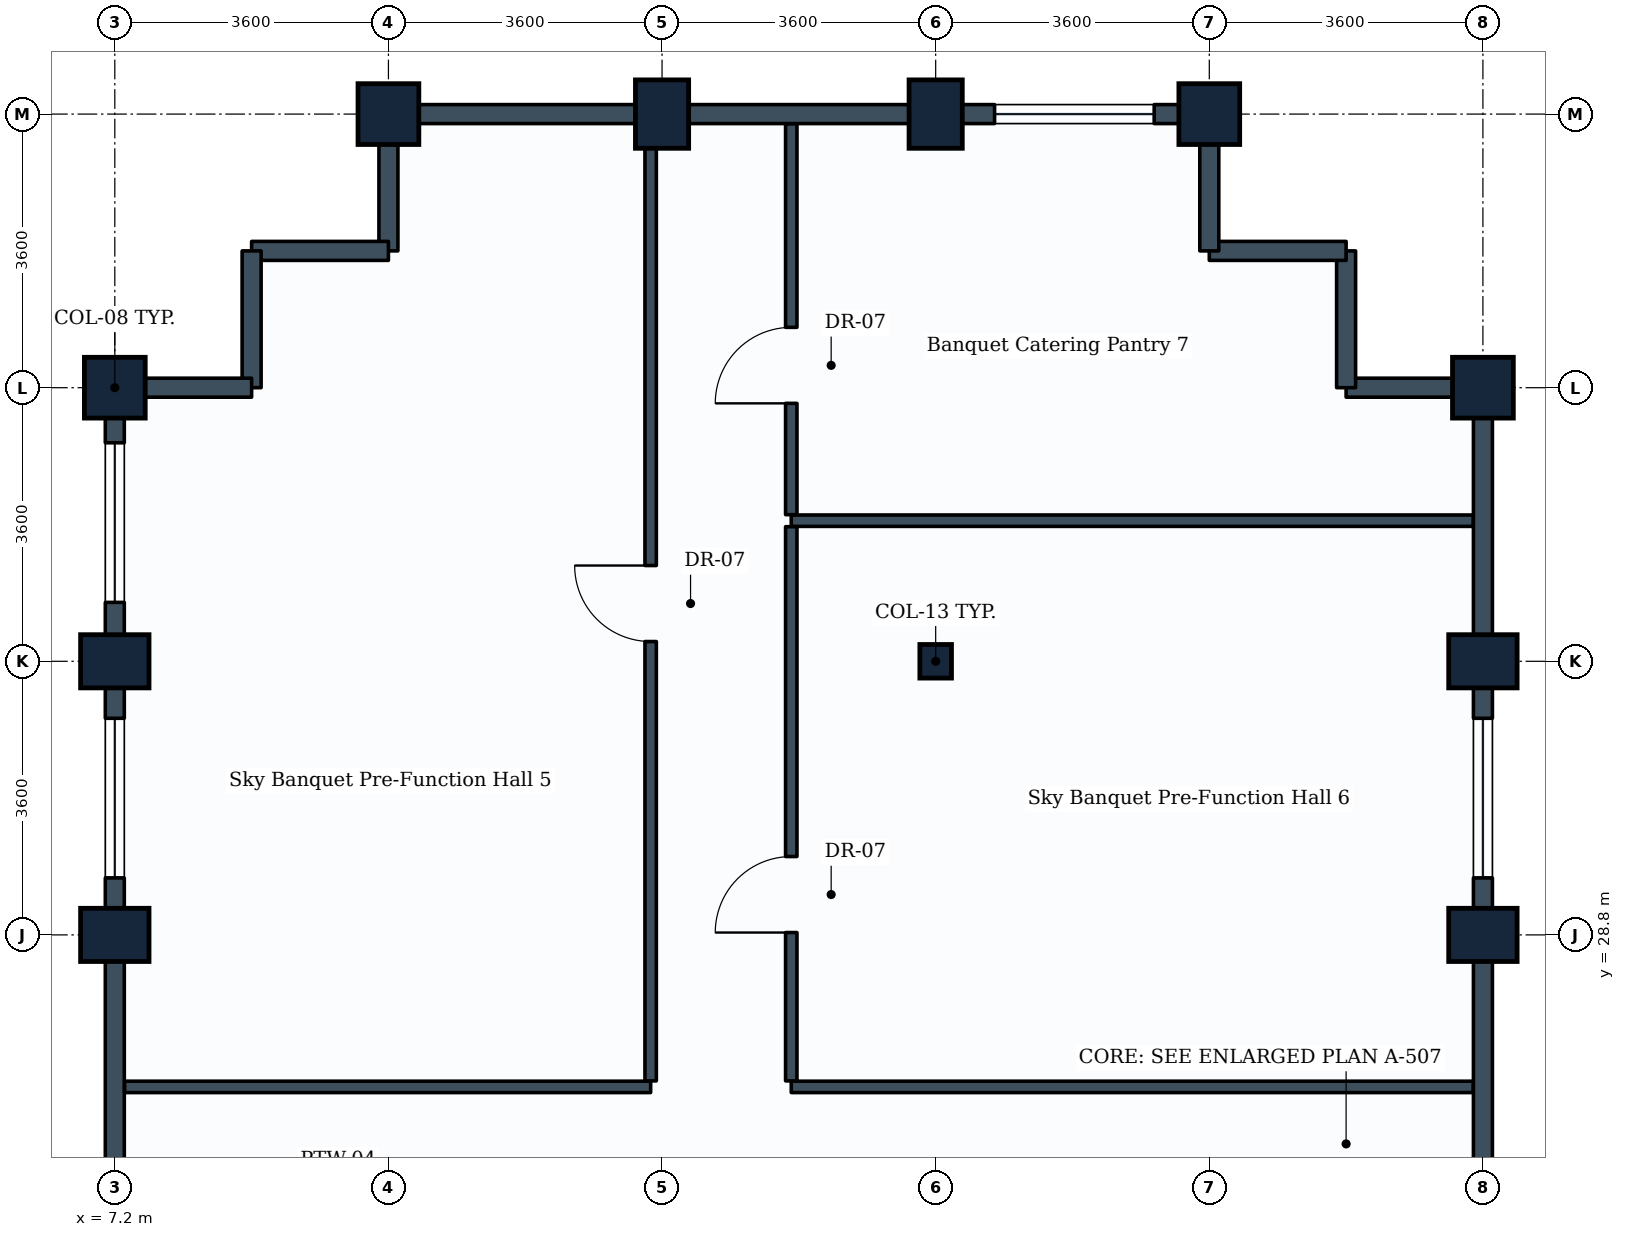
"""IFC4 building model, lengths in metres.
Left out: names, types, materials, properties, quantities, classifications, styles, units other than length and angle.
Written with IfcOpenShell. Run it as: python <this file> out.ifc"""

import sys

from ifc_helpers import new_model, si_unit, direction, frame, frame_2d, origin, origin_2d, place, context, subcontext, project, spatial, rectangle, i_section, extrude, element, fill, save


model = new_model("IFC4")
c1 = context("Model", 3, precision=1e-05, world=origin(), true_north=direction((0.0, 1.0)))
c2 = subcontext(c1, "Body", "Model", "MODEL_VIEW")
j1 = project(units=[si_unit("LENGTHUNIT", "METRE"), si_unit("PLANEANGLEUNIT", "RADIAN")], contexts=[c1])
p1 = place(None, origin())
s1 = spatial("IfcSite", under=j1, at=p1, CompositionType="ELEMENT")
p2 = place(p1, origin())
s2 = spatial("IfcBuilding", under=s1, at=p2, CompositionType="ELEMENT")
p3 = place(p2, frame((0.0, 0.0, 201.4)))
s3 = spatial("IfcBuildingStorey", under=s2, at=p3, CompositionType="ELEMENT", Elevation=201.4)
for number, where, z_axis, x_axis in (
    (1, (7.2, 28.8, 0.0), (0.0, 0.0, 1.0), (0.0, 1.0, 0.0)),
    (2, (7.2, 32.4, 0.0), (0.0, 0.0, 1.0), (0.0, 1.0, 0.0)),
):
    element("IfcColumn", number, at=place(p3, frame(where, z_axis=z_axis, x_axis=x_axis)), inside=s3, PredefinedType="COLUMN", context=c2, shape_type="SweptSolid", body=[
        extrude(rectangle(XDim=0.7, YDim=0.9, at=origin_2d()), origin(), (0.0, 0.0, 1.0), 3.8),
    ])
for number, where, z_axis, x_axis in (
    (3, (7.2, 36.0, 0.0), (0.0, 0.0, 1.0), (0.0, 1.0, 0.0)),
    (4, (10.8, 39.6, 0.0), (0.0, 0.0, 1.0), (1.0, 0.0, 0.0)),
):
    element("IfcColumn", number, at=place(p3, frame(where, z_axis=z_axis, x_axis=x_axis)), inside=s3, PredefinedType="COLUMN", context=c2, shape_type="SweptSolid", body=[
        extrude(rectangle(XDim=0.8, YDim=0.8, at=origin_2d()), origin(), (0.0, 0.0, 1.0), 3.8),
    ])
p4 = place(p3, frame((14.4, 39.6, 0.0), z_axis=(0.0, 0.0, 1.0), x_axis=(1.0, 0.0, 0.0)))
e5 = element("IfcColumn", 5, at=p4, inside=s3, PredefinedType="COLUMN", context=c2, shape_type="SweptSolid", body=[
    extrude(rectangle(XDim=0.7, YDim=0.9, at=origin_2d()), origin(), (0.0, 0.0, 1.0), 3.8),
])
p5 = place(p3, frame((18.0, 32.4, 0.0), z_axis=(0.0, 0.0, 1.0), x_axis=(1.0, 0.0, 0.0)))
e6 = element("IfcColumn", 6, at=p5, inside=s3, PredefinedType="COLUMN", context=c2, shape_type="SweptSolid", body=[
    extrude(i_section(OverallWidth=0.416, OverallDepth=0.442, WebThickness=0.025, FlangeThickness=0.041, FilletRadius=0.015, at=origin_2d()), origin(), (0.0, 0.0, 1.0), 3.8),
])
p6 = place(p3, frame((18.0, 39.6, 0.0), z_axis=(0.0, 0.0, 1.0), x_axis=(1.0, 0.0, 0.0)))
e7 = element("IfcColumn", 7, at=p6, inside=s3, PredefinedType="COLUMN", context=c2, shape_type="SweptSolid", body=[
    extrude(rectangle(XDim=0.7, YDim=0.9, at=origin_2d()), origin(), (0.0, 0.0, 1.0), 3.8),
])
p7 = place(p3, frame((21.6, 39.6, 0.0), z_axis=(0.0, 0.0, 1.0), x_axis=(1.0, 0.0, 0.0)))
e8 = element("IfcColumn", 8, at=p7, inside=s3, PredefinedType="COLUMN", context=c2, shape_type="SweptSolid", body=[
    extrude(rectangle(XDim=0.8, YDim=0.8, at=origin_2d()), origin(), (0.0, 0.0, 1.0), 3.8),
])
for number, where, z_axis, x_axis in (
    (9, (25.2, 28.8, 0.0), (0.0, 0.0, 1.0), (0.0, 1.0, 0.0)),
    (10, (25.2, 32.4, 0.0), (0.0, 0.0, 1.0), (0.0, 1.0, 0.0)),
):
    element("IfcColumn", number, at=place(p3, frame(where, z_axis=z_axis, x_axis=x_axis)), inside=s3, PredefinedType="COLUMN", context=c2, shape_type="SweptSolid", body=[
        extrude(rectangle(XDim=0.7, YDim=0.9, at=origin_2d()), origin(), (0.0, 0.0, 1.0), 3.8),
    ])
p8 = place(p3, frame((25.2, 36.0, 0.0), z_axis=(0.0, 0.0, 1.0), x_axis=(0.0, 1.0, 0.0)))
e11 = element("IfcColumn", 11, at=p8, inside=s3, PredefinedType="COLUMN", context=c2, shape_type="SweptSolid", body=[
    extrude(rectangle(XDim=0.8, YDim=0.8, at=origin_2d()), origin(), (0.0, 0.0, 1.0), 3.8),
])
p9 = place(p3, frame((25.2, 25.2, 0.0), z_axis=(0.0, 0.0, 1.0), x_axis=(0.0, 1.0, 0.0)))
e12 = element("IfcWall", 12, at=p9, inside=s3, PredefinedType="STANDARD", context=c2, shape_type="SweptSolid", body=[
    extrude(rectangle(XDim=3.6, YDim=0.25, at=frame_2d((1.8, 0.0))), origin(), (0.0, 0.0, 1.0), 2.93),
])
p10 = place(p3, frame((25.2, 28.8, 0.0), z_axis=(0.0, 0.0, 1.0), x_axis=(0.0, 1.0, 0.0)))
e13 = element("IfcWall", 13, at=p10, inside=s3, PredefinedType="STANDARD", context=c2, shape_type="SweptSolid", body=[
    extrude(rectangle(XDim=3.6, YDim=0.25, at=frame_2d((1.8, 0.0))), origin(), (0.0, 0.0, 1.0), 2.93),
])
p11 = place(p10, frame((0.75, 0.0, 0.85)))
e14 = element("IfcOpeningElement", 14, at=p11, cuts=e13, PredefinedType="OPENING", context=c2, shape_type="SweptSolid", body=[
    extrude(rectangle(XDim=2.1, YDim=1.35, at=frame_2d((1.05, 0.675))), frame((0.0, 0.135, 0.0), z_axis=(0.0, -1.0, 0.0), x_axis=(1.0, 0.0, 0.0)), (0.0, 0.0, 1.0), 0.27),
])
p12 = place(p3, frame((25.2, 32.4, 0.0), z_axis=(0.0, 0.0, 1.0), x_axis=(0.0, 1.0, 0.0)))
e15 = element("IfcWall", 15, at=p12, inside=s3, PredefinedType="STANDARD", context=c2, shape_type="SweptSolid", body=[
    extrude(rectangle(XDim=3.6, YDim=0.25, at=frame_2d((1.8, 0.0))), origin(), (0.0, 0.0, 1.0), 2.93),
])
p13 = place(p3, frame((23.4, 36.0, 0.0), z_axis=(0.0, 0.0, 1.0), x_axis=(1.0, 0.0, 0.0)))
e16 = element("IfcWall", 16, at=p13, inside=s3, PredefinedType="STANDARD", context=c2, shape_type="SweptSolid", body=[
    extrude(rectangle(XDim=1.8, YDim=0.25, at=frame_2d((0.9, 0.0))), origin(), (0.0, 0.0, 1.0), 2.93),
])
p14 = place(p3, frame((23.4, 36.0, 0.0), z_axis=(0.0, 0.0, 1.0), x_axis=(0.0, 1.0, 0.0)))
e17 = element("IfcWall", 17, at=p14, inside=s3, PredefinedType="STANDARD", context=c2, shape_type="SweptSolid", body=[
    extrude(rectangle(XDim=1.8, YDim=0.25, at=frame_2d((0.9, 0.0))), origin(), (0.0, 0.0, 1.0), 3.535),
])
p15 = place(p3, frame((21.6, 37.8, 0.0), z_axis=(0.0, 0.0, 1.0), x_axis=(1.0, 0.0, 0.0)))
e18 = element("IfcWall", 18, at=p15, inside=s3, PredefinedType="STANDARD", context=c2, shape_type="SweptSolid", body=[
    extrude(rectangle(XDim=1.8, YDim=0.25, at=frame_2d((0.9, 0.0))), origin(), (0.0, 0.0, 1.0), 3.535),
])
p16 = place(p3, frame((21.6, 37.8, 0.0), z_axis=(0.0, 0.0, 1.0), x_axis=(0.0, 1.0, 0.0)))
e19 = element("IfcWall", 19, at=p16, inside=s3, PredefinedType="STANDARD", context=c2, shape_type="SweptSolid", body=[
    extrude(rectangle(XDim=1.8, YDim=0.25, at=frame_2d((0.9, 0.0))), origin(), (0.0, 0.0, 1.0), 2.93),
])
p17 = place(p3, frame((18.0, 39.6, 0.0), z_axis=(0.0, 0.0, 1.0), x_axis=(1.0, 0.0, 0.0)))
e20 = element("IfcWall", 20, at=p17, inside=s3, PredefinedType="STANDARD", context=c2, shape_type="SweptSolid", body=[
    extrude(rectangle(XDim=3.6, YDim=0.25, at=frame_2d((1.8, 0.0))), origin(), (0.0, 0.0, 1.0), 2.93),
])
p18 = place(p17, frame((0.775, 0.0, 0.85)))
e21 = element("IfcOpeningElement", 21, at=p18, cuts=e20, PredefinedType="OPENING", context=c2, shape_type="SweptSolid", body=[
    extrude(rectangle(XDim=2.1, YDim=1.35, at=frame_2d((1.05, 0.675))), frame((0.0, 0.135, 0.0), z_axis=(0.0, -1.0, 0.0), x_axis=(1.0, 0.0, 0.0)), (0.0, 0.0, 1.0), 0.27),
])
p19 = place(p3, frame((14.4, 39.6, 0.0), z_axis=(0.0, 0.0, 1.0), x_axis=(1.0, 0.0, 0.0)))
e22 = element("IfcWall", 22, at=p19, inside=s3, PredefinedType="STANDARD", context=c2, shape_type="SweptSolid", body=[
    extrude(rectangle(XDim=3.6, YDim=0.25, at=frame_2d((1.8, 0.0))), origin(), (0.0, 0.0, 1.0), 2.93),
])
p20 = place(p3, frame((10.8, 39.6, 0.0), z_axis=(0.0, 0.0, 1.0), x_axis=(1.0, 0.0, 0.0)))
e23 = element("IfcWall", 23, at=p20, inside=s3, PredefinedType="STANDARD", context=c2, shape_type="SweptSolid", body=[
    extrude(rectangle(XDim=3.6, YDim=0.25, at=frame_2d((1.8, 0.0))), origin(), (0.0, 0.0, 1.0), 2.93),
])
p21 = place(p3, frame((10.8, 37.8, 0.0), z_axis=(0.0, 0.0, 1.0), x_axis=(0.0, 1.0, 0.0)))
e24 = element("IfcWall", 24, at=p21, inside=s3, PredefinedType="STANDARD", context=c2, shape_type="SweptSolid", body=[
    extrude(rectangle(XDim=1.8, YDim=0.25, at=frame_2d((0.9, 0.0))), origin(), (0.0, 0.0, 1.0), 2.93),
])
for number, where, z_axis, x_axis in (
    (25, (9.0, 37.8, 0.0), (0.0, 0.0, 1.0), (1.0, 0.0, 0.0)),
    (26, (9.0, 36.0, 0.0), (0.0, 0.0, 1.0), (0.0, 1.0, 0.0)),
):
    element("IfcWall", number, at=place(p3, frame(where, z_axis=z_axis, x_axis=x_axis)), inside=s3, PredefinedType="STANDARD", context=c2, shape_type="SweptSolid", body=[
        extrude(rectangle(XDim=1.8, YDim=0.25, at=frame_2d((0.9, 0.0))), origin(), (0.0, 0.0, 1.0), 3.535),
    ])
p22 = place(p3, frame((7.2, 36.0, 0.0), z_axis=(0.0, 0.0, 1.0), x_axis=(1.0, 0.0, 0.0)))
e27 = element("IfcWall", 27, at=p22, inside=s3, PredefinedType="STANDARD", context=c2, shape_type="SweptSolid", body=[
    extrude(rectangle(XDim=1.8, YDim=0.25, at=frame_2d((0.9, 0.0))), origin(), (0.0, 0.0, 1.0), 2.93),
])
p23 = place(p3, frame((7.2, 32.4, 0.0), z_axis=(0.0, 0.0, 1.0), x_axis=(0.0, 1.0, 0.0)))
e28 = element("IfcWall", 28, at=p23, inside=s3, PredefinedType="STANDARD", context=c2, shape_type="SweptSolid", body=[
    extrude(rectangle(XDim=3.6, YDim=0.25, at=frame_2d((1.8, 0.0))), origin(), (0.0, 0.0, 1.0), 2.93),
])
p24 = place(p23, frame((0.775, 0.0, 0.85)))
e29 = element("IfcOpeningElement", 29, at=p24, cuts=e28, PredefinedType="OPENING", context=c2, shape_type="SweptSolid", body=[
    extrude(rectangle(XDim=2.1, YDim=1.35, at=frame_2d((1.05, 0.675))), frame((0.0, 0.135, 0.0), z_axis=(0.0, -1.0, 0.0), x_axis=(1.0, 0.0, 0.0)), (0.0, 0.0, 1.0), 0.27),
])
p25 = place(p3, frame((7.2, 28.8, 0.0), z_axis=(0.0, 0.0, 1.0), x_axis=(0.0, 1.0, 0.0)))
e30 = element("IfcWall", 30, at=p25, inside=s3, PredefinedType="STANDARD", context=c2, shape_type="SweptSolid", body=[
    extrude(rectangle(XDim=3.6, YDim=0.25, at=frame_2d((1.8, 0.0))), origin(), (0.0, 0.0, 1.0), 2.93),
])
p26 = place(p25, frame((0.75, 0.0, 0.85)))
e31 = element("IfcOpeningElement", 31, at=p26, cuts=e30, PredefinedType="OPENING", context=c2, shape_type="SweptSolid", body=[
    extrude(rectangle(XDim=2.1, YDim=1.35, at=frame_2d((1.05, 0.675))), frame((0.0, 0.135, 0.0), z_axis=(0.0, -1.0, 0.0), x_axis=(1.0, 0.0, 0.0)), (0.0, 0.0, 1.0), 0.27),
])
p27 = place(p3, frame((7.2, 25.2, 0.0), z_axis=(0.0, 0.0, 1.0), x_axis=(0.0, 1.0, 0.0)))
e32 = element("IfcWall", 32, at=p27, inside=s3, PredefinedType="STANDARD", context=c2, shape_type="SweptSolid", body=[
    extrude(rectangle(XDim=3.6, YDim=0.25, at=frame_2d((1.8, 0.0))), origin(), (0.0, 0.0, 1.0), 2.93),
])
p28 = place(p3, frame((7.329, 26.8, 0.0), z_axis=(0.0, 0.0, 1.0), x_axis=(1.0, 0.0, 0.0)))
e33 = element("IfcWall", 33, at=p28, inside=s3, PredefinedType="PARTITIONING", context=c2, shape_type="SweptSolid", body=[
    extrude(rectangle(XDim=6.921, YDim=0.15, at=frame_2d((3.46, 0.0))), origin(), (0.0, 0.0, 1.0), 2.93),
])
p29 = place(p3, frame((14.25, 26.879, 0.0), z_axis=(0.0, 0.0, 1.0), x_axis=(0.0, 1.0, 0.0)))
e34 = element("IfcWall", 34, at=p29, inside=s3, PredefinedType="PARTITIONING", context=c2, shape_type="SweptSolid", body=[
    extrude(rectangle(XDim=12.592, YDim=0.15, at=frame_2d((6.296, 0.0))), origin(), (0.0, 0.0, 1.0), 2.93),
])
p30 = place(p29, frame((5.781, 0.0, 0.0)))
e35 = element("IfcOpeningElement", 35, at=p30, cuts=e34, PredefinedType="OPENING", context=c2, shape_type="SweptSolid", body=[
    extrude(rectangle(XDim=1.0, YDim=2.1, at=frame_2d((0.5, 1.05))), frame((0.0, 0.085, 0.0), z_axis=(0.0, -1.0, 0.0), x_axis=(1.0, 0.0, 0.0)), (0.0, 0.0, 1.0), 0.17),
])
for number, where, z_axis, x_axis in (
    (36, (16.1, 26.8, 0.0), (0.0, 0.0, 1.0), (1.0, 0.0, 0.0)),
    (37, (16.1, 34.25, 0.0), (0.0, 0.0, 1.0), (1.0, 0.0, 0.0)),
):
    element("IfcWall", number, at=place(p3, frame(where, z_axis=z_axis, x_axis=x_axis)), inside=s3, PredefinedType="PARTITIONING", context=c2, shape_type="SweptSolid", body=[
        extrude(rectangle(XDim=8.971, YDim=0.15, at=frame_2d((4.485, 0.0))), origin(), (0.0, 0.0, 1.0), 2.93),
    ])
p31 = place(p3, frame((16.1, 26.879, 0.0), z_axis=(0.0, 0.0, 1.0), x_axis=(0.0, 1.0, 0.0)))
e38 = element("IfcWall", 38, at=p31, inside=s3, PredefinedType="PARTITIONING", context=c2, shape_type="SweptSolid", body=[
    extrude(rectangle(XDim=7.292, YDim=0.15, at=frame_2d((3.646, 0.0))), origin(), (0.0, 0.0, 1.0), 3.17),
])
p32 = place(p31, frame((1.952, 0.0, 0.0)))
e39 = element("IfcOpeningElement", 39, at=p32, cuts=e38, PredefinedType="OPENING", context=c2, shape_type="SweptSolid", body=[
    extrude(rectangle(XDim=1.0, YDim=2.1, at=frame_2d((0.5, 1.05))), frame((0.0, 0.085, 0.0), z_axis=(0.0, -1.0, 0.0), x_axis=(1.0, 0.0, 0.0)), (0.0, 0.0, 1.0), 0.17),
])
p33 = place(p3, frame((16.1, 34.329, 0.0), z_axis=(0.0, 0.0, 1.0), x_axis=(0.0, 1.0, 0.0)))
e40 = element("IfcWall", 40, at=p33, inside=s3, PredefinedType="PARTITIONING", context=c2, shape_type="SweptSolid", body=[
    extrude(rectangle(XDim=5.142, YDim=0.15, at=frame_2d((2.571, 0.0))), origin(), (0.0, 0.0, 1.0), 2.93),
])
p34 = place(p33, frame((1.465, 0.0, 0.0)))
e41 = element("IfcOpeningElement", 41, at=p34, cuts=e40, PredefinedType="OPENING", context=c2, shape_type="SweptSolid", body=[
    extrude(rectangle(XDim=1.0, YDim=2.1, at=frame_2d((0.5, 1.05))), frame((0.0, 0.085, 0.0), z_axis=(0.0, -1.0, 0.0), x_axis=(1.0, 0.0, 0.0)), (0.0, 0.0, 1.0), 0.17),
])
p35 = place(p11, origin())
e42 = element("IfcWindow", 42, at=p35, inside=s3, PartitioningType="SINGLE_PANEL", PredefinedType="WINDOW", context=c2, shape_type="SweptSolid", body=[
    extrude(rectangle(XDim=2.1, YDim=1.35, at=frame_2d((1.05, 0.675))), frame((0.0, 0.03, 0.0), z_axis=(0.0, -1.0, 0.0), x_axis=(1.0, 0.0, 0.0)), (0.0, 0.0, 1.0), 0.06),
])
fill(e14, e42)
p36 = place(p18, origin())
e43 = element("IfcWindow", 43, at=p36, inside=s3, PartitioningType="SINGLE_PANEL", PredefinedType="WINDOW", context=c2, shape_type="SweptSolid", body=[
    extrude(rectangle(XDim=2.1, YDim=1.35, at=frame_2d((1.05, 0.675))), frame((0.0, 0.03, 0.0), z_axis=(0.0, -1.0, 0.0), x_axis=(1.0, 0.0, 0.0)), (0.0, 0.0, 1.0), 0.06),
])
fill(e21, e43)
p37 = place(p24, origin())
e44 = element("IfcWindow", 44, at=p37, inside=s3, PartitioningType="SINGLE_PANEL", PredefinedType="WINDOW", context=c2, shape_type="SweptSolid", body=[
    extrude(rectangle(XDim=2.1, YDim=1.35, at=frame_2d((1.05, 0.675))), frame((0.0, 0.03, 0.0), z_axis=(0.0, -1.0, 0.0), x_axis=(1.0, 0.0, 0.0)), (0.0, 0.0, 1.0), 0.06),
])
fill(e29, e44)
p38 = place(p26, origin())
e45 = element("IfcWindow", 45, at=p38, inside=s3, PartitioningType="SINGLE_PANEL", PredefinedType="WINDOW", context=c2, shape_type="SweptSolid", body=[
    extrude(rectangle(XDim=2.1, YDim=1.35, at=frame_2d((1.05, 0.675))), frame((0.0, 0.03, 0.0), z_axis=(0.0, -1.0, 0.0), x_axis=(1.0, 0.0, 0.0)), (0.0, 0.0, 1.0), 0.06),
])
fill(e31, e45)
p39 = place(p30, origin())
e46 = element("IfcDoor", 46, at=p39, inside=s3, OperationType="SINGLE_SWING_RIGHT", PredefinedType="DOOR", context=c2, shape_type="SweptSolid", body=[
    extrude(rectangle(XDim=1.0, YDim=2.1, at=frame_2d((0.5, 1.05))), frame((0.0, 0.025, 0.0), z_axis=(0.0, -1.0, 0.0), x_axis=(1.0, 0.0, 0.0)), (0.0, 0.0, 1.0), 0.05),
])
fill(e35, e46)
p40 = place(p32, origin())
e47 = element("IfcDoor", 47, at=p40, inside=s3, OperationType="SINGLE_SWING_LEFT", PredefinedType="DOOR", context=c2, shape_type="SweptSolid", body=[
    extrude(rectangle(XDim=1.0, YDim=2.1, at=frame_2d((0.5, 1.05))), frame((0.0, 0.025, 0.0), z_axis=(0.0, -1.0, 0.0), x_axis=(1.0, 0.0, 0.0)), (0.0, 0.0, 1.0), 0.05),
])
fill(e39, e47)
p41 = place(p34, origin())
e48 = element("IfcDoor", 48, at=p41, inside=s3, OperationType="SINGLE_SWING_LEFT", PredefinedType="DOOR", context=c2, shape_type="SweptSolid", body=[
    extrude(rectangle(XDim=1.0, YDim=2.1, at=frame_2d((0.5, 1.05))), frame((0.0, 0.025, 0.0), z_axis=(0.0, -1.0, 0.0), x_axis=(1.0, 0.0, 0.0)), (0.0, 0.0, 1.0), 0.05),
])
fill(e41, e48)
save(model, sys.argv[1])
